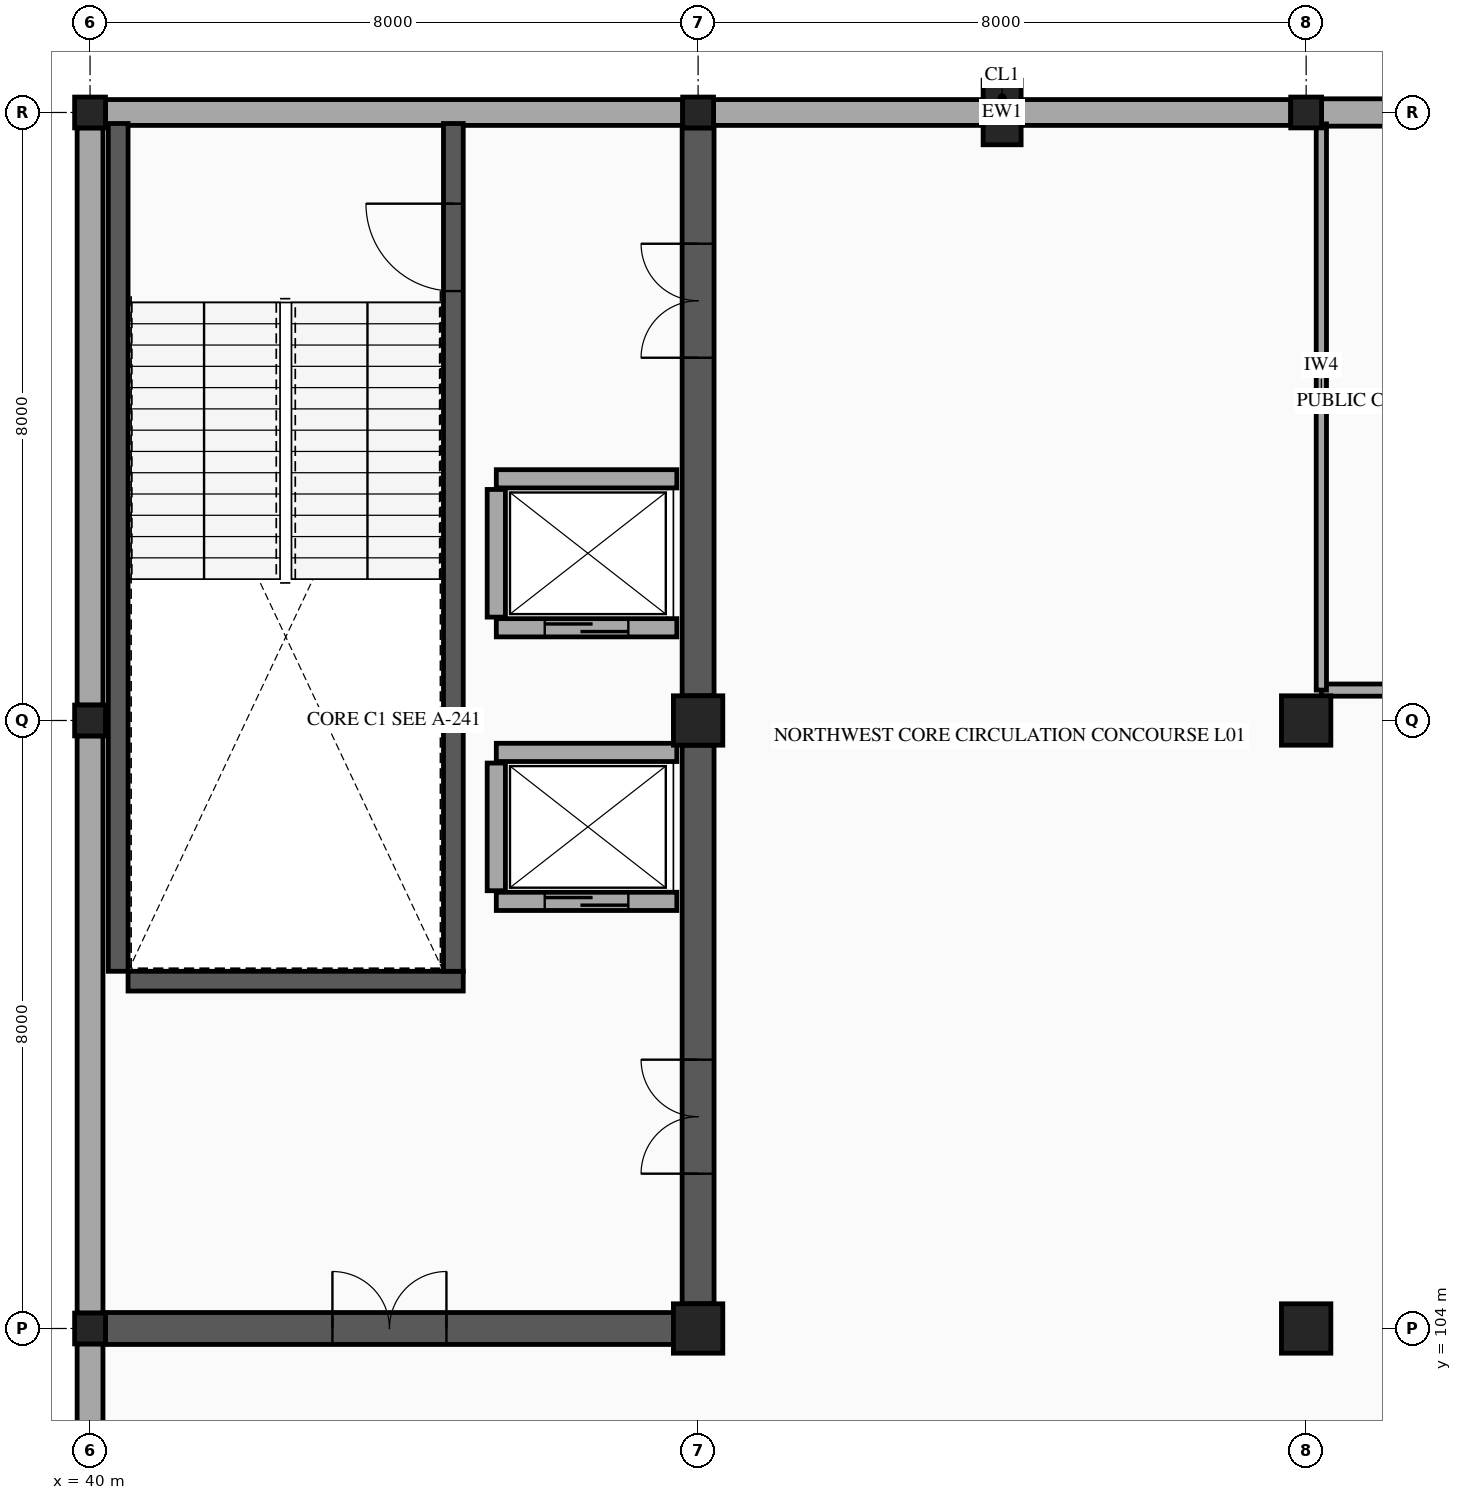
"""IFC4 building model, lengths in metres.
Left out: names, types, materials, properties, quantities, classifications, styles, units other than length and angle.
Written with IfcOpenShell. Run it as: python <this file> out.ifc"""

import sys

from ifc_helpers import new_model, si_unit, direction, frame, frame_2d, origin, origin_2d, place, context, subcontext, project, spatial, rectangle, hollow_rectangle, extrude, element, fill, save


model = new_model("IFC4")
c1 = context("Model", 3, precision=1e-05, world=origin(), true_north=direction((0.0, 1.0)))
c2 = subcontext(c1, "Body", "Model", "MODEL_VIEW")
j1 = project(units=[si_unit("LENGTHUNIT", "METRE"), si_unit("PLANEANGLEUNIT", "RADIAN")], contexts=[c1])
p1 = place(None, origin())
s1 = spatial("IfcSite", under=j1, at=p1, CompositionType="ELEMENT")
p2 = place(p1, origin())
s2 = spatial("IfcBuilding", under=s1, at=p2, CompositionType="ELEMENT")
p3 = place(p2, frame((0.0, 0.0, 5.6)))
s3 = spatial("IfcBuildingStorey", under=s2, at=p3, CompositionType="ELEMENT", Elevation=5.6)
for number, where, z_axis, x_axis in (
    (1, (40.0, 104.0, 0.0), (0.0, 0.0, 1.0), (1.0, 0.0, 0.0)),
    (2, (40.0, 112.0, 0.0), (0.0, 0.0, 1.0), (1.0, 0.0, 0.0)),
    (3, (40.0, 120.0, 0.0), (0.0, 0.0, 1.0), (1.0, 0.0, 0.0)),
):
    element("IfcColumn", number, at=place(p3, frame(where, z_axis=z_axis, x_axis=x_axis)), inside=s3, PredefinedType="COLUMN", context=c2, shape_type="SweptSolid", body=[
        extrude(hollow_rectangle(XDim=0.406, YDim=0.406, WallThickness=0.015, InnerFilletRadius=0.015, OuterFilletRadius=0.029, at=origin_2d()), origin(), (0.0, 0.0, 1.0), 4.8),
    ])
for number, where, z_axis, x_axis in (
    (4, (48.0, 104.0, 0.0), (0.0, 0.0, 1.0), (1.0, 0.0, 0.0)),
    (5, (48.0, 112.0, 0.0), (0.0, 0.0, 1.0), (1.0, 0.0, 0.0)),
):
    element("IfcColumn", number, at=place(p3, frame(where, z_axis=z_axis, x_axis=x_axis)), inside=s3, PredefinedType="COLUMN", context=c2, shape_type="SweptSolid", body=[
        extrude(rectangle(XDim=0.65, YDim=0.65, at=origin_2d()), origin(), (0.0, 0.0, 1.0), 4.8),
    ])
p4 = place(p3, frame((48.0, 120.0, 0.0), z_axis=(0.0, 0.0, 1.0), x_axis=(1.0, 0.0, 0.0)))
e6 = element("IfcColumn", 6, at=p4, inside=s3, PredefinedType="COLUMN", context=c2, shape_type="SweptSolid", body=[
    extrude(hollow_rectangle(XDim=0.406, YDim=0.406, WallThickness=0.015, InnerFilletRadius=0.015, OuterFilletRadius=0.029, at=origin_2d()), origin(), (0.0, 0.0, 1.0), 4.8),
])
for number, where, z_axis, x_axis in (
    (7, (56.0, 104.0, 0.0), (0.0, 0.0, 1.0), (1.0, 0.0, 0.0)),
    (8, (56.0, 112.0, 0.0), (0.0, 0.0, 1.0), (1.0, 0.0, 0.0)),
):
    element("IfcColumn", number, at=place(p3, frame(where, z_axis=z_axis, x_axis=x_axis)), inside=s3, PredefinedType="COLUMN", context=c2, shape_type="SweptSolid", body=[
        extrude(rectangle(XDim=0.65, YDim=0.65, at=origin_2d()), origin(), (0.0, 0.0, 1.0), 4.8),
    ])
p5 = place(p3, frame((56.0, 120.0, 0.0), z_axis=(0.0, 0.0, 1.0), x_axis=(1.0, 0.0, 0.0)))
e9 = element("IfcColumn", 9, at=p5, inside=s3, PredefinedType="COLUMN", context=c2, shape_type="SweptSolid", body=[
    extrude(hollow_rectangle(XDim=0.406, YDim=0.406, WallThickness=0.015, InnerFilletRadius=0.015, OuterFilletRadius=0.029, at=origin_2d()), origin(), (0.0, 0.0, 1.0), 4.8),
])
p6 = place(p3, frame((52.0, 120.0, 0.0), z_axis=(0.0, 0.0, 1.0), x_axis=(1.0, 0.0, 0.0)))
e10 = element("IfcColumn", 10, at=p6, inside=s3, PredefinedType="PILASTER", context=c2, shape_type="SweptSolid", body=[
    extrude(rectangle(XDim=0.5, YDim=0.85, at=origin_2d()), origin(), (0.0, 0.0, 1.0), 4.8),
])
p7 = place(p3, frame((40.0, 96.203, 0.0), z_axis=(0.0, 0.0, 1.0), x_axis=(0.0, 1.0, 0.0)))
e11 = element("IfcWall", 11, at=p7, inside=s3, PredefinedType="STANDARD", context=c2, shape_type="SweptSolid", body=[
    extrude(rectangle(XDim=7.594, YDim=0.34, at=frame_2d((3.797, 0.0))), origin(), (0.0, 0.0, 1.0), 3.78),
])
p8 = place(p7, frame((2.547, 0.0, 0.8)))
e12 = element("IfcOpeningElement", 12, at=p8, cuts=e11, PredefinedType="OPENING", context=c2, shape_type="SweptSolid", body=[
    extrude(rectangle(XDim=2.5, YDim=2.25, at=frame_2d((1.25, 1.125))), frame((0.0, 0.18, 0.0), z_axis=(0.0, -1.0, 0.0), x_axis=(1.0, 0.0, 0.0)), (0.0, 0.0, 1.0), 0.36),
])
for number, where, z_axis, x_axis in (
    (13, (40.0, 104.203, 0.0), (0.0, 0.0, 1.0), (0.0, 1.0, 0.0)),
    (14, (40.0, 112.203, 0.0), (0.0, 0.0, 1.0), (0.0, 1.0, 0.0)),
    (15, (40.203, 120.0, 0.0), (0.0, 0.0, 1.0), (1.0, 0.0, 0.0)),
    (16, (48.203, 120.0, 0.0), (0.0, 0.0, 1.0), (1.0, 0.0, 0.0)),
):
    element("IfcWall", number, at=place(p3, frame(where, z_axis=z_axis, x_axis=x_axis)), inside=s3, PredefinedType="STANDARD", context=c2, shape_type="SweptSolid", body=[
        extrude(rectangle(XDim=7.594, YDim=0.34, at=frame_2d((3.797, 0.0))), origin(), (0.0, 0.0, 1.0), 3.78),
    ])
p9 = place(p3, frame((56.203, 120.0, 0.0), z_axis=(0.0, 0.0, 1.0), x_axis=(1.0, 0.0, 0.0)))
e17 = element("IfcWall", 17, at=p9, inside=s3, PredefinedType="SOLIDWALL", context=c2, shape_type="SweptSolid", body=[
    extrude(rectangle(XDim=7.594, YDim=0.36, at=frame_2d((3.797, 0.0))), origin(), (0.0, 0.0, 1.0), 3.78),
])
p10 = place(p3, frame((40.5, 108.57, 0.0), z_axis=(0.0, 0.0, 1.0), x_axis=(1.0, 0.0, 0.0)))
e18 = element("IfcWall", 18, at=p10, inside=s3, PredefinedType="SHEAR", context=c2, shape_type="SweptSolid", body=[
    extrude(rectangle(XDim=4.41, YDim=0.26, at=frame_2d((2.205, 0.0))), origin(), (0.0, 0.0, 1.0), 4.58),
])
p11 = place(p3, frame((40.37, 108.7, 0.0), z_axis=(0.0, 0.0, 1.0), x_axis=(0.0, 1.0, 0.0)))
e19 = element("IfcWall", 19, at=p11, inside=s3, PredefinedType="SHEAR", context=c2, shape_type="SweptSolid", body=[
    extrude(rectangle(XDim=11.155, YDim=0.26, at=frame_2d((5.578, 0.0))), origin(), (0.0, 0.0, 1.0), 4.58),
])
p12 = place(p3, frame((44.78, 108.7, 0.0), z_axis=(0.0, 0.0, 1.0), x_axis=(0.0, 1.0, 0.0)))
e20 = element("IfcWall", 20, at=p12, inside=s3, PredefinedType="SHEAR", context=c2, shape_type="SweptSolid", body=[
    extrude(rectangle(XDim=11.155, YDim=0.26, at=frame_2d((5.578, 0.0))), origin(), (0.0, 0.0, 1.0), 4.58),
])
p13 = place(p12, frame((8.95, 0.0, 0.0)))
e21 = element("IfcOpeningElement", 21, at=p13, cuts=e20, PredefinedType="OPENING", context=c2, shape_type="SweptSolid", body=[
    extrude(rectangle(XDim=1.15, YDim=2.15, at=frame_2d((0.575, 1.075))), frame((0.0, 0.14, 0.0), z_axis=(0.0, -1.0, 0.0), x_axis=(1.0, 0.0, 0.0)), (0.0, 0.0, 1.0), 0.28),
])
p14 = place(p3, frame((40.203, 104.0, 0.0), z_axis=(0.0, 0.0, 1.0), x_axis=(1.0, 0.0, 0.0)))
e22 = element("IfcWall", 22, at=p14, inside=s3, PredefinedType="SHEAR", context=c2, shape_type="SweptSolid", body=[
    extrude(rectangle(XDim=7.472, YDim=0.42, at=frame_2d((3.736, 0.0))), origin(), (0.0, 0.0, 1.0), 4.58),
])
p15 = place(p14, frame((2.986, 0.0, 0.0)))
e23 = element("IfcOpeningElement", 23, at=p15, cuts=e22, PredefinedType="OPENING", context=c2, shape_type="SweptSolid", body=[
    extrude(rectangle(XDim=1.5, YDim=2.15, at=frame_2d((0.75, 1.075))), frame((0.0, 0.22, 0.0), z_axis=(0.0, -1.0, 0.0), x_axis=(1.0, 0.0, 0.0)), (0.0, 0.0, 1.0), 0.44),
])
p16 = place(p3, frame((48.0, 104.325, 0.0), z_axis=(0.0, 0.0, 1.0), x_axis=(0.0, 1.0, 0.0)))
e24 = element("IfcWall", 24, at=p16, inside=s3, PredefinedType="SHEAR", context=c2, shape_type="SweptSolid", body=[
    extrude(rectangle(XDim=7.35, YDim=0.42, at=frame_2d((3.675, 0.0))), origin(), (0.0, 0.0, 1.0), 4.58),
])
p17 = place(p16, frame((1.712, 0.0, 0.0)))
e25 = element("IfcOpeningElement", 25, at=p17, cuts=e24, PredefinedType="OPENING", context=c2, shape_type="SweptSolid", body=[
    extrude(rectangle(XDim=1.5, YDim=2.15, at=frame_2d((0.75, 1.075))), frame((0.0, 0.22, 0.0), z_axis=(0.0, -1.0, 0.0), x_axis=(1.0, 0.0, 0.0)), (0.0, 0.0, 1.0), 0.44),
])
p18 = place(p3, frame((48.0, 112.325, 0.0), z_axis=(0.0, 0.0, 1.0), x_axis=(0.0, 1.0, 0.0)))
e26 = element("IfcWall", 26, at=p18, inside=s3, PredefinedType="SHEAR", context=c2, shape_type="SweptSolid", body=[
    extrude(rectangle(XDim=7.472, YDim=0.42, at=frame_2d((3.736, 0.0))), origin(), (0.0, 0.0, 1.0), 4.58),
])
p19 = place(p18, frame((4.448, 0.0, 0.0)))
e27 = element("IfcOpeningElement", 27, at=p19, cuts=e26, PredefinedType="OPENING", context=c2, shape_type="SweptSolid", body=[
    extrude(rectangle(XDim=1.5, YDim=2.15, at=frame_2d((0.75, 1.075))), frame((0.0, 0.22, 0.0), z_axis=(0.0, -1.0, 0.0), x_axis=(1.0, 0.0, 0.0)), (0.0, 0.0, 1.0), 0.44),
])
p20 = place(p3, frame((45.345, 113.22, 0.0), z_axis=(0.0, 0.0, 1.0), x_axis=(1.0, 0.0, 0.0)))
e28 = element("IfcWall", 28, at=p20, inside=s3, PredefinedType="PARTITIONING", context=c2, shape_type="SweptSolid", body=[
    extrude(rectangle(XDim=2.375, YDim=0.24, at=frame_2d((1.188, 0.0))), origin(), (0.0, 0.0, 1.0), 4.58),
])
p21 = place(p20, frame((0.637, 0.0, 0.0)))
e29 = element("IfcOpeningElement", 29, at=p21, cuts=e28, PredefinedType="OPENING", context=c2, shape_type="SweptSolid", body=[
    extrude(rectangle(XDim=1.1, YDim=2.15, at=frame_2d((0.55, 1.075))), frame((0.0, 0.13, 0.0), z_axis=(0.0, -1.0, 0.0), x_axis=(1.0, 0.0, 0.0)), (0.0, 0.0, 1.0), 0.26),
])
p22 = place(p3, frame((45.345, 115.18, 0.0), z_axis=(0.0, 0.0, 1.0), x_axis=(1.0, 0.0, 0.0)))
e30 = element("IfcWall", 30, at=p22, inside=s3, PredefinedType="PARTITIONING", context=c2, shape_type="SweptSolid", body=[
    extrude(rectangle(XDim=2.375, YDim=0.24, at=frame_2d((1.188, 0.0))), origin(), (0.0, 0.0, 1.0), 4.58),
])
p23 = place(p3, frame((45.345, 113.36, 0.0), z_axis=(0.0, 0.0, 1.0), x_axis=(0.0, 1.0, 0.0)))
e31 = element("IfcWall", 31, at=p23, inside=s3, PredefinedType="PARTITIONING", context=c2, shape_type="SweptSolid", body=[
    extrude(rectangle(XDim=1.68, YDim=0.24, at=frame_2d((0.84, 0.0))), origin(), (0.0, 0.0, 1.0), 4.58),
])
p24 = place(p3, frame((45.345, 109.62, 0.0), z_axis=(0.0, 0.0, 1.0), x_axis=(1.0, 0.0, 0.0)))
e32 = element("IfcWall", 32, at=p24, inside=s3, PredefinedType="PARTITIONING", context=c2, shape_type="SweptSolid", body=[
    extrude(rectangle(XDim=2.375, YDim=0.24, at=frame_2d((1.188, 0.0))), origin(), (0.0, 0.0, 1.0), 4.58),
])
p25 = place(p24, frame((0.637, 0.0, 0.0)))
e33 = element("IfcOpeningElement", 33, at=p25, cuts=e32, PredefinedType="OPENING", context=c2, shape_type="SweptSolid", body=[
    extrude(rectangle(XDim=1.1, YDim=2.15, at=frame_2d((0.55, 1.075))), frame((0.0, 0.13, 0.0), z_axis=(0.0, -1.0, 0.0), x_axis=(1.0, 0.0, 0.0)), (0.0, 0.0, 1.0), 0.26),
])
p26 = place(p3, frame((45.345, 111.58, 0.0), z_axis=(0.0, 0.0, 1.0), x_axis=(1.0, 0.0, 0.0)))
e34 = element("IfcWall", 34, at=p26, inside=s3, PredefinedType="PARTITIONING", context=c2, shape_type="SweptSolid", body=[
    extrude(rectangle(XDim=2.375, YDim=0.24, at=frame_2d((1.188, 0.0))), origin(), (0.0, 0.0, 1.0), 4.58),
])
p27 = place(p3, frame((45.345, 109.76, 0.0), z_axis=(0.0, 0.0, 1.0), x_axis=(0.0, 1.0, 0.0)))
e35 = element("IfcWall", 35, at=p27, inside=s3, PredefinedType="PARTITIONING", context=c2, shape_type="SweptSolid", body=[
    extrude(rectangle(XDim=1.68, YDim=0.24, at=frame_2d((0.84, 0.0))), origin(), (0.0, 0.0, 1.0), 4.58),
])
p28 = place(p3, frame((56.2, 112.4, 0.0), z_axis=(0.0, 0.0, 1.0), x_axis=(1.0, 0.0, 0.0)))
e36 = element("IfcWall", 36, at=p28, inside=s3, PredefinedType="PARTITIONING", context=c2, shape_type="SweptSolid", body=[
    extrude(rectangle(XDim=4.7, YDim=0.16, at=frame_2d((2.35, 0.0))), origin(), (0.0, 0.0, 1.0), 3.78),
])
p29 = place(p28, frame((3.193, 0.0, 0.0)))
e37 = element("IfcOpeningElement", 37, at=p29, cuts=e36, PredefinedType="OPENING", context=c2, shape_type="SweptSolid", body=[
    extrude(rectangle(XDim=0.92, YDim=2.1, at=frame_2d((0.46, 1.05))), frame((0.0, 0.09, 0.0), z_axis=(0.0, -1.0, 0.0), x_axis=(1.0, 0.0, 0.0)), (0.0, 0.0, 1.0), 0.18),
])
p30 = place(p3, frame((56.2, 112.4, 0.0), z_axis=(0.0, 0.0, 1.0), x_axis=(0.0, 1.0, 0.0)))
e38 = element("IfcWall", 38, at=p30, inside=s3, PredefinedType="PARTITIONING", context=c2, shape_type="SweptSolid", body=[
    extrude(rectangle(XDim=7.45, YDim=0.135, at=frame_2d((3.725, 0.0))), origin(), (0.0, 0.0, 1.0), 3.78),
])
p31 = place(p13, origin())
e39 = element("IfcDoor", 39, at=p31, inside=s3, OperationType="SINGLE_SWING_RIGHT", PredefinedType="DOOR", context=c2, shape_type="SweptSolid", body=[
    extrude(rectangle(XDim=1.15, YDim=2.15, at=frame_2d((0.575, 1.075))), frame((0.0, 0.025, 0.0), z_axis=(0.0, -1.0, 0.0), x_axis=(1.0, 0.0, 0.0)), (0.0, 0.0, 1.0), 0.05),
])
fill(e21, e39)
p32 = place(p15, origin())
e40 = element("IfcDoor", 40, at=p32, inside=s3, OperationType="DOUBLE_DOOR_SINGLE_SWING", PredefinedType="DOOR", context=c2, shape_type="SweptSolid", body=[
    extrude(rectangle(XDim=1.5, YDim=2.15, at=frame_2d((0.75, 1.075))), frame((0.0, 0.025, 0.0), z_axis=(0.0, -1.0, 0.0), x_axis=(1.0, 0.0, 0.0)), (0.0, 0.0, 1.0), 0.05),
])
fill(e23, e40)
p33 = place(p17, origin())
e41 = element("IfcDoor", 41, at=p33, inside=s3, OperationType="DOUBLE_DOOR_SINGLE_SWING", PredefinedType="DOOR", context=c2, shape_type="SweptSolid", body=[
    extrude(rectangle(XDim=1.5, YDim=2.15, at=frame_2d((0.75, 1.075))), frame((0.0, 0.025, 0.0), z_axis=(0.0, -1.0, 0.0), x_axis=(1.0, 0.0, 0.0)), (0.0, 0.0, 1.0), 0.05),
])
fill(e25, e41)
p34 = place(p19, origin())
e42 = element("IfcDoor", 42, at=p34, inside=s3, OperationType="DOUBLE_DOOR_SINGLE_SWING", PredefinedType="DOOR", context=c2, shape_type="SweptSolid", body=[
    extrude(rectangle(XDim=1.5, YDim=2.15, at=frame_2d((0.75, 1.075))), frame((0.0, 0.025, 0.0), z_axis=(0.0, -1.0, 0.0), x_axis=(1.0, 0.0, 0.0)), (0.0, 0.0, 1.0), 0.05),
])
fill(e27, e42)
p35 = place(p21, origin())
e43 = element("IfcDoor", 43, at=p35, inside=s3, OperationType="SLIDING_TO_LEFT", PredefinedType="DOOR", context=c2, shape_type="SweptSolid", body=[
    extrude(rectangle(XDim=1.1, YDim=2.15, at=frame_2d((0.55, 1.075))), frame((0.0, 0.025, 0.0), z_axis=(0.0, -1.0, 0.0), x_axis=(1.0, 0.0, 0.0)), (0.0, 0.0, 1.0), 0.05),
])
fill(e29, e43)
p36 = place(p25, origin())
e44 = element("IfcDoor", 44, at=p36, inside=s3, OperationType="SLIDING_TO_LEFT", PredefinedType="DOOR", context=c2, shape_type="SweptSolid", body=[
    extrude(rectangle(XDim=1.1, YDim=2.15, at=frame_2d((0.55, 1.075))), frame((0.0, 0.025, 0.0), z_axis=(0.0, -1.0, 0.0), x_axis=(1.0, 0.0, 0.0)), (0.0, 0.0, 1.0), 0.05),
])
fill(e33, e44)
save(model, sys.argv[1])
